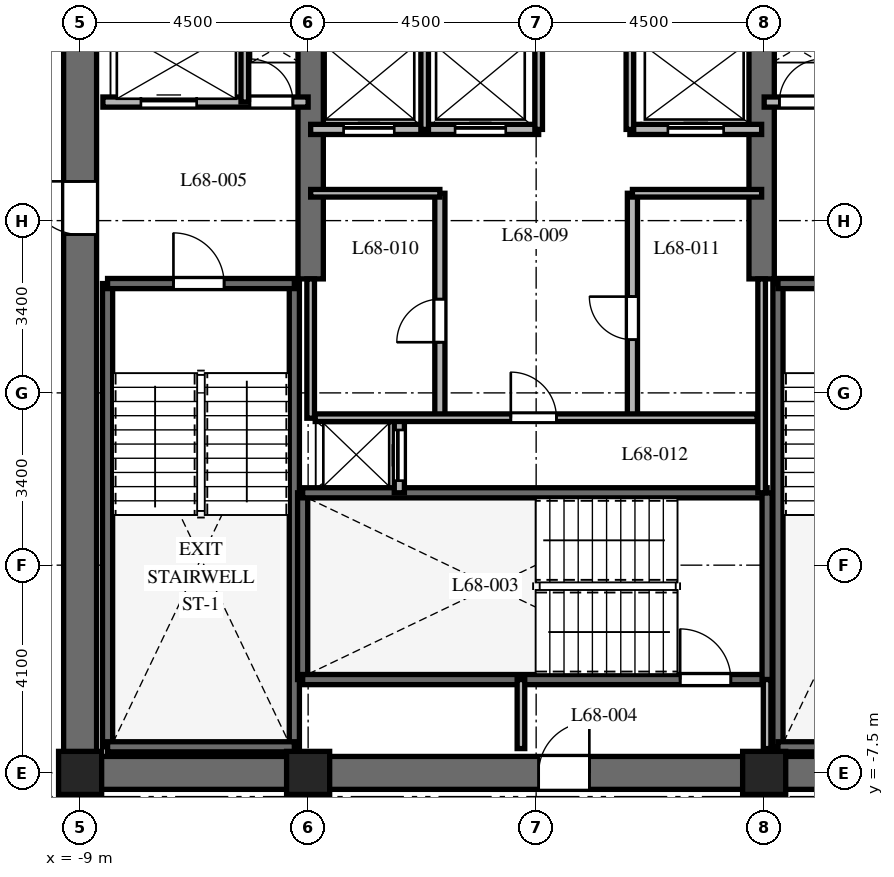
"""IFC4 building model, lengths in metres.
Left out: names, types, materials, properties, quantities, classifications, styles, units other than length and angle.
Written with IfcOpenShell. Run it as: python <this file> out.ifc"""

import sys

from ifc_helpers import new_model, si_unit, direction, frame, frame_2d, origin, origin_2d, place, context, subcontext, project, spatial, rectangle, extrude, element, fill, save


model = new_model("IFC4")
c1 = context("Model", 3, precision=1e-05, world=origin(), true_north=direction((0.0, 1.0)))
c2 = subcontext(c1, "Body", "Model", "MODEL_VIEW")
j1 = project(units=[si_unit("LENGTHUNIT", "METRE"), si_unit("PLANEANGLEUNIT", "RADIAN")], contexts=[c1])
p1 = place(None, origin())
s1 = spatial("IfcSite", under=j1, at=p1, CompositionType="ELEMENT")
p2 = place(p1, origin())
s2 = spatial("IfcBuilding", under=s1, at=p2, CompositionType="ELEMENT")
p3 = place(p2, frame((0.0, 0.0, 273.0)))
s3 = spatial("IfcBuildingStorey", under=s2, at=p3, CompositionType="ELEMENT", Elevation=273.0)
p4 = place(p3, frame((-9.325, -7.5, 0.0), z_axis=(0.0, 0.0, 1.0), x_axis=(1.0, 0.0, 0.0)))
e1 = element("IfcWall", 1, at=p4, inside=s3, PredefinedType="SHEAR", context=c2, shape_type="SweptSolid", body=[
    extrude(rectangle(XDim=18.65, YDim=0.65, at=frame_2d((9.325, 0.0))), origin(), (0.0, 0.0, 1.0), 3.9),
])
p5 = place(p4, frame((9.375, 0.0, 0.0)))
e2 = element("IfcOpeningElement", 2, at=p5, cuts=e1, PredefinedType="OPENING", context=c2, shape_type="SweptSolid", body=[
    extrude(rectangle(XDim=1.0, YDim=2.15, at=frame_2d((0.5, 1.075))), frame((0.0, 0.335, 0.0), z_axis=(0.0, -1.0, 0.0), x_axis=(1.0, 0.0, 0.0)), (0.0, 0.0, 1.0), 0.67),
])
p6 = place(p3, frame((-9.0, -7.175, 0.0), z_axis=(0.0, 0.0, 1.0), x_axis=(0.0, 1.0, 0.0)))
e3 = element("IfcWall", 3, at=p6, inside=s3, PredefinedType="SHEAR", context=c2, shape_type="SweptSolid", body=[
    extrude(rectangle(XDim=14.35, YDim=0.65, at=frame_2d((7.175, 0.0))), origin(), (0.0, 0.0, 1.0), 3.9),
])
p7 = place(p6, frame((10.3, 0.0, 0.0)))
e4 = element("IfcOpeningElement", 4, at=p7, cuts=e3, PredefinedType="OPENING", context=c2, shape_type="SweptSolid", body=[
    extrude(rectangle(XDim=1.05, YDim=2.15, at=frame_2d((0.525, 1.075))), frame((0.0, 0.335, 0.0), z_axis=(0.0, -1.0, 0.0), x_axis=(1.0, 0.0, 0.0)), (0.0, 0.0, 1.0), 0.67),
])
for number, where, z_axis, x_axis in (
    (5, (-4.45, 2.25, 0.0), (0.0, 0.0, 1.0), (0.0, 1.0, 0.0)),
    (6, (4.45, 2.25, 0.0), (0.0, 0.0, 1.0), (0.0, 1.0, 0.0)),
):
    element("IfcWall", number, at=place(p3, frame(where, z_axis=z_axis, x_axis=x_axis)), inside=s3, PredefinedType="SHEAR", context=c2, shape_type="SweptSolid", body=[
        extrude(rectangle(XDim=4.925, YDim=0.5, at=frame_2d((2.462, 0.0))), origin(), (0.0, 0.0, 1.0), 3.9),
    ])
for number, where, z_axis, x_axis in (
    (7, (-8.458, -6.985, 0.0), (0.0, 0.0, 1.0), (0.0, 1.0, 0.0)),
    (8, (-4.772, -6.985, 0.0), (0.0, 0.0, 1.0), (0.0, 1.0, 0.0)),
):
    element("IfcWall", number, at=place(p3, frame(where, z_axis=z_axis, x_axis=x_axis)), inside=s3, PredefinedType="SHEAR", context=c2, shape_type="SweptSolid", body=[
        extrude(rectangle(XDim=9.143, YDim=0.2, at=frame_2d((4.572, 0.0))), origin(), (0.0, 0.0, 1.0), 3.9),
    ])
p8 = place(p3, frame((-8.458, -6.985, 0.0), z_axis=(0.0, 0.0, 1.0), x_axis=(1.0, 0.0, 0.0)))
e9 = element("IfcWall", 9, at=p8, inside=s3, PredefinedType="SHEAR", context=c2, shape_type="SweptSolid", body=[
    extrude(rectangle(XDim=3.686, YDim=0.2, at=frame_2d((1.843, 0.0))), origin(), (0.0, 0.0, 1.0), 3.9),
])
p9 = place(p3, frame((-8.458, 2.158, 0.0), z_axis=(0.0, 0.0, 1.0), x_axis=(1.0, 0.0, 0.0)))
e10 = element("IfcWall", 10, at=p9, inside=s3, PredefinedType="SHEAR", context=c2, shape_type="SweptSolid", body=[
    extrude(rectangle(XDim=3.686, YDim=0.2, at=frame_2d((1.843, 0.0))), origin(), (0.0, 0.0, 1.0), 3.9),
])
p10 = place(p9, frame((1.3, 0.0, 0.0)))
e11 = element("IfcOpeningElement", 11, at=p10, cuts=e10, PredefinedType="OPENING", context=c2, shape_type="SweptSolid", body=[
    extrude(rectangle(XDim=1.0, YDim=2.15, at=frame_2d((0.5, 1.075))), frame((0.0, 0.11, 0.0), z_axis=(0.0, -1.0, 0.0), x_axis=(1.0, 0.0, 0.0)), (0.0, 0.0, 1.0), 0.22),
])
p11 = place(p3, frame((4.772, -6.985, 0.0), z_axis=(0.0, 0.0, 1.0), x_axis=(0.0, 1.0, 0.0)))
e12 = element("IfcWall", 12, at=p11, inside=s3, PredefinedType="SHEAR", context=c2, shape_type="SweptSolid", body=[
    extrude(rectangle(XDim=9.143, YDim=0.2, at=frame_2d((4.572, 0.0))), origin(), (0.0, 0.0, 1.0), 3.9),
])
p12 = place(p3, frame((4.772, -6.985, 0.0), z_axis=(0.0, 0.0, 1.0), x_axis=(1.0, 0.0, 0.0)))
e13 = element("IfcWall", 13, at=p12, inside=s3, PredefinedType="SHEAR", context=c2, shape_type="SweptSolid", body=[
    extrude(rectangle(XDim=3.686, YDim=0.2, at=frame_2d((1.843, 0.0))), origin(), (0.0, 0.0, 1.0), 3.9),
])
p13 = place(p3, frame((4.772, 2.158, 0.0), z_axis=(0.0, 0.0, 1.0), x_axis=(1.0, 0.0, 0.0)))
e14 = element("IfcWall", 14, at=p13, inside=s3, PredefinedType="SHEAR", context=c2, shape_type="SweptSolid", body=[
    extrude(rectangle(XDim=3.686, YDim=0.2, at=frame_2d((1.843, 0.0))), origin(), (0.0, 0.0, 1.0), 3.9),
])
p14 = place(p13, frame((1.35, 0.0, 0.0)))
e15 = element("IfcOpeningElement", 15, at=p14, cuts=e14, PredefinedType="OPENING", context=c2, shape_type="SweptSolid", body=[
    extrude(rectangle(XDim=1.0, YDim=2.15, at=frame_2d((0.5, 1.075))), frame((0.0, 0.11, 0.0), z_axis=(0.0, -1.0, 0.0), x_axis=(1.0, 0.0, 0.0)), (0.0, 0.0, 1.0), 0.22),
])
p15 = place(p3, frame((-4.608, -5.658, 0.0), z_axis=(0.0, 0.0, 1.0), x_axis=(0.0, 1.0, 0.0)))
e16 = element("IfcWall", 16, at=p15, inside=s3, PredefinedType="SHEAR", context=c2, shape_type="SweptSolid", body=[
    extrude(rectangle(XDim=3.686, YDim=0.2, at=frame_2d((1.843, 0.0))), origin(), (0.0, 0.0, 1.0), 3.9),
])
p16 = place(p3, frame((-4.608, -5.658, 0.0), z_axis=(0.0, 0.0, 1.0), x_axis=(1.0, 0.0, 0.0)))
e17 = element("IfcWall", 17, at=p16, inside=s3, PredefinedType="SHEAR", context=c2, shape_type="SweptSolid", body=[
    extrude(rectangle(XDim=9.166, YDim=0.2, at=frame_2d((4.583, 0.0))), origin(), (0.0, 0.0, 1.0), 3.9),
])
p17 = place(p16, frame((7.45, 0.0, 0.0)))
e18 = element("IfcOpeningElement", 18, at=p17, cuts=e17, PredefinedType="OPENING", context=c2, shape_type="SweptSolid", body=[
    extrude(rectangle(XDim=1.0, YDim=2.15, at=frame_2d((0.5, 1.075))), frame((0.0, 0.11, 0.0), z_axis=(0.0, -1.0, 0.0), x_axis=(1.0, 0.0, 0.0)), (0.0, 0.0, 1.0), 0.22),
])
p18 = place(p3, frame((-4.608, -1.972, 0.0), z_axis=(0.0, 0.0, 1.0), x_axis=(1.0, 0.0, 0.0)))
e19 = element("IfcWall", 19, at=p18, inside=s3, PredefinedType="SHEAR", context=c2, shape_type="SweptSolid", body=[
    extrude(rectangle(XDim=9.166, YDim=0.2, at=frame_2d((4.583, 0.0))), origin(), (0.0, 0.0, 1.0), 3.9),
])
p19 = place(p3, frame((4.558, -5.658, 0.0), z_axis=(0.0, 0.0, 1.0), x_axis=(0.0, 1.0, 0.0)))
e20 = element("IfcWall", 20, at=p19, inside=s3, PredefinedType="SHEAR", context=c2, shape_type="SweptSolid", body=[
    extrude(rectangle(XDim=3.686, YDim=0.2, at=frame_2d((1.843, 0.0))), origin(), (0.0, 0.0, 1.0), 3.9),
])
for number, where, z_axis, x_axis in (
    (21, (-9.0, -7.5, 0.0), (0.0, 0.0, 1.0), (1.0, 0.0, 0.0)),
    (22, (-4.5, -7.5, 0.0), (0.0, 0.0, 1.0), (1.0, 0.0, 0.0)),
    (23, (4.5, -7.5, 0.0), (0.0, 0.0, 1.0), (1.0, 0.0, 0.0)),
):
    element("IfcColumn", number, at=place(p3, frame(where, z_axis=z_axis, x_axis=x_axis)), inside=s3, PredefinedType="COLUMN", context=c2, shape_type="SweptSolid", body=[
        extrude(rectangle(XDim=0.85, YDim=0.85, at=origin_2d()), origin(), (0.0, 0.0, 1.0), 3.9),
    ])
for number, where, z_axis, x_axis in (
    (24, (-0.3, -7.02, 0.0), (0.0, 0.0, 1.0), (0.0, 1.0, 0.0)),
    (25, (4.558, -7.02, 0.0), (0.0, 0.0, 1.0), (0.0, 1.0, 0.0)),
):
    element("IfcWall", number, at=place(p3, frame(where, z_axis=z_axis, x_axis=x_axis)), inside=s3, PredefinedType="PARTITIONING", context=c2, shape_type="SweptSolid", body=[
        extrude(rectangle(XDim=1.362, YDim=0.15, at=frame_2d((0.681, 0.0))), origin(), (0.0, 0.0, 1.0), 3.6),
    ])
p20 = place(p3, frame((-8.55, 5.74, 0.0), z_axis=(0.0, 0.0, 1.0), x_axis=(1.0, 0.0, 0.0)))
e26 = element("IfcWall", 26, at=p20, inside=s3, PredefinedType="PARTITIONING", context=c2, shape_type="SweptSolid", body=[
    extrude(rectangle(XDim=4.05, YDim=0.2, at=frame_2d((2.025, 0.0))), origin(), (0.0, 0.0, 1.0), 3.6),
])
p21 = place(p20, frame((0.75, 0.0, 0.0)))
e27 = element("IfcOpeningElement", 27, at=p21, cuts=e26, PredefinedType="OPENING", context=c2, shape_type="SweptSolid", body=[
    extrude(rectangle(XDim=1.1, YDim=2.2, at=frame_2d((0.55, 1.1))), frame((0.0, 0.11, 0.0), z_axis=(0.0, -1.0, 0.0), x_axis=(1.0, 0.0, 0.0)), (0.0, 0.0, 1.0), 0.22),
])
p22 = place(p20, frame((2.9, 0.0, 0.0)))
e28 = element("IfcOpeningElement", 28, at=p22, cuts=e26, PredefinedType="OPENING", context=c2, shape_type="SweptSolid", body=[
    extrude(rectangle(XDim=0.85, YDim=2.03, at=frame_2d((0.425, 1.015))), frame((0.0, 0.11, 0.0), z_axis=(0.0, -1.0, 0.0), x_axis=(1.0, 0.0, 0.0)), (0.0, 0.0, 1.0), 0.22),
])
p23 = place(p3, frame((-5.75, 5.74, 0.0), z_axis=(0.0, 0.0, 1.0), x_axis=(0.0, 1.0, 0.0)))
e29 = element("IfcWall", 29, at=p23, inside=s3, PredefinedType="PARTITIONING", context=c2, shape_type="SweptSolid", body=[
    extrude(rectangle(XDim=1.41, YDim=0.15, at=frame_2d((0.705, 0.0))), origin(), (0.0, 0.0, 1.0), 3.6),
])
p24 = place(p3, frame((4.5, 5.74, 0.0), z_axis=(0.0, 0.0, 1.0), x_axis=(1.0, 0.0, 0.0)))
e30 = element("IfcWall", 30, at=p24, inside=s3, PredefinedType="PARTITIONING", context=c2, shape_type="SweptSolid", body=[
    extrude(rectangle(XDim=4.05, YDim=0.2, at=frame_2d((2.025, 0.0))), origin(), (0.0, 0.0, 1.0), 3.6),
])
p25 = place(p24, frame((0.3, 0.0, 0.0)))
e31 = element("IfcOpeningElement", 31, at=p25, cuts=e30, PredefinedType="OPENING", context=c2, shape_type="SweptSolid", body=[
    extrude(rectangle(XDim=0.85, YDim=2.03, at=frame_2d((0.425, 1.015))), frame((0.0, 0.11, 0.0), z_axis=(0.0, -1.0, 0.0), x_axis=(1.0, 0.0, 0.0)), (0.0, 0.0, 1.0), 0.22),
])
p26 = place(p24, frame((2.15, 0.0, 0.0)))
e32 = element("IfcOpeningElement", 32, at=p26, cuts=e30, PredefinedType="OPENING", context=c2, shape_type="SweptSolid", body=[
    extrude(rectangle(XDim=1.1, YDim=2.2, at=frame_2d((0.55, 1.1))), frame((0.0, 0.11, 0.0), z_axis=(0.0, -1.0, 0.0), x_axis=(1.0, 0.0, 0.0)), (0.0, 0.0, 1.0), 0.22),
])
p27 = place(p3, frame((-2.7, -1.972, 0.0), z_axis=(0.0, 0.0, 1.0), x_axis=(0.0, 1.0, 0.0)))
e33 = element("IfcWall", 33, at=p27, inside=s3, PredefinedType="PARTITIONING", context=c2, shape_type="SweptSolid", body=[
    extrude(rectangle(XDim=1.472, YDim=0.2, at=frame_2d((0.736, 0.0))), origin(), (0.0, 0.0, 1.0), 3.6),
])
p28 = place(p27, frame((0.24, 0.0, 0.0)))
e34 = element("IfcOpeningElement", 34, at=p28, cuts=e33, PredefinedType="OPENING", context=c2, shape_type="SweptSolid", body=[
    extrude(rectangle(XDim=1.0, YDim=2.2, at=frame_2d((0.5, 1.1))), frame((0.0, 0.11, 0.0), z_axis=(0.0, -1.0, 0.0), x_axis=(1.0, 0.0, 0.0)), (0.0, 0.0, 1.0), 0.22),
])
p29 = place(p3, frame((-4.45, 5.2, 0.0), z_axis=(0.0, 0.0, 1.0), x_axis=(1.0, 0.0, 0.0)))
e35 = element("IfcWall", 35, at=p29, inside=s3, PredefinedType="PARTITIONING", context=c2, shape_type="SweptSolid", body=[
    extrude(rectangle(XDim=4.5, YDim=0.2, at=frame_2d((2.25, 0.0))), origin(), (0.0, 0.0, 1.0), 3.6),
])
p30 = place(p29, frame((0.65, 0.0, 0.0)))
e36 = element("IfcOpeningElement", 36, at=p30, cuts=e35, PredefinedType="OPENING", context=c2, shape_type="SweptSolid", body=[
    extrude(rectangle(XDim=1.0, YDim=2.2, at=frame_2d((0.5, 1.1))), frame((0.0, 0.11, 0.0), z_axis=(0.0, -1.0, 0.0), x_axis=(1.0, 0.0, 0.0)), (0.0, 0.0, 1.0), 0.22),
])
p31 = place(p29, frame((2.85, 0.0, 0.0)))
e37 = element("IfcOpeningElement", 37, at=p31, cuts=e35, PredefinedType="OPENING", context=c2, shape_type="SweptSolid", body=[
    extrude(rectangle(XDim=1.0, YDim=2.2, at=frame_2d((0.5, 1.1))), frame((0.0, 0.11, 0.0), z_axis=(0.0, -1.0, 0.0), x_axis=(1.0, 0.0, 0.0)), (0.0, 0.0, 1.0), 0.22),
])
p32 = place(p3, frame((1.85, 5.2, 0.0), z_axis=(0.0, 0.0, 1.0), x_axis=(1.0, 0.0, 0.0)))
e38 = element("IfcWall", 38, at=p32, inside=s3, PredefinedType="PARTITIONING", context=c2, shape_type="SweptSolid", body=[
    extrude(rectangle(XDim=2.6, YDim=0.2, at=frame_2d((1.3, 0.0))), origin(), (0.0, 0.0, 1.0), 3.6),
])
p33 = place(p32, frame((0.75, 0.0, 0.0)))
e39 = element("IfcOpeningElement", 39, at=p33, cuts=e38, PredefinedType="OPENING", context=c2, shape_type="SweptSolid", body=[
    extrude(rectangle(XDim=1.1, YDim=2.2, at=frame_2d((0.55, 1.1))), frame((0.0, 0.11, 0.0), z_axis=(0.0, -1.0, 0.0), x_axis=(1.0, 0.0, 0.0)), (0.0, 0.0, 1.0), 0.22),
])
p34 = place(p3, frame((-2.2, 5.2, 0.0), z_axis=(0.0, 0.0, 1.0), x_axis=(0.0, 1.0, 0.0)))
e40 = element("IfcWall", 40, at=p34, inside=s3, PredefinedType="PARTITIONING", context=c2, shape_type="SweptSolid", body=[
    extrude(rectangle(XDim=1.85, YDim=0.15, at=frame_2d((0.925, 0.0))), origin(), (0.0, 0.0, 1.0), 3.6),
])
for number, where, z_axis, x_axis in (
    (41, (0.05, 5.2, 0.0), (0.0, 0.0, 1.0), (0.0, 1.0, 0.0)),
    (42, (1.85, 5.2, 0.0), (0.0, 0.0, 1.0), (0.0, 1.0, 0.0)),
):
    element("IfcWall", number, at=place(p3, frame(where, z_axis=z_axis, x_axis=x_axis)), inside=s3, PredefinedType="PARTITIONING", context=c2, shape_type="SweptSolid", body=[
        extrude(rectangle(XDim=1.95, YDim=0.15, at=frame_2d((0.975, 0.0))), origin(), (0.0, 0.0, 1.0), 3.6),
    ])
p35 = place(p3, frame((-4.45, -0.5, 0.0), z_axis=(0.0, 0.0, 1.0), x_axis=(0.0, 1.0, 0.0)))
e43 = element("IfcWall", 43, at=p35, inside=s3, PredefinedType="PARTITIONING", context=c2, shape_type="SweptSolid", body=[
    extrude(rectangle(XDim=2.75, YDim=0.15, at=frame_2d((1.375, 0.0))), origin(), (0.0, 0.0, 1.0), 3.6),
])
p36 = place(p3, frame((4.45, -1.972, 0.0), z_axis=(0.0, 0.0, 1.0), x_axis=(0.0, 1.0, 0.0)))
e44 = element("IfcWall", 44, at=p36, inside=s3, PredefinedType="PARTITIONING", context=c2, shape_type="SweptSolid", body=[
    extrude(rectangle(XDim=4.222, YDim=0.15, at=frame_2d((2.111, 0.0))), origin(), (0.0, 0.0, 1.0), 3.6),
])
p37 = place(p3, frame((-1.9, -0.5, 0.0), z_axis=(0.0, 0.0, 1.0), x_axis=(0.0, 1.0, 0.0)))
e45 = element("IfcWall", 45, at=p37, inside=s3, PredefinedType="PARTITIONING", context=c2, shape_type="SweptSolid", body=[
    extrude(rectangle(XDim=4.44, YDim=0.2, at=frame_2d((2.22, 0.0))), origin(), (0.0, 0.0, 1.0), 3.6),
])
p38 = place(p37, frame((1.5, 0.0, 0.0)))
e46 = element("IfcOpeningElement", 46, at=p38, cuts=e45, PredefinedType="OPENING", context=c2, shape_type="SweptSolid", body=[
    extrude(rectangle(XDim=0.85, YDim=2.03, at=frame_2d((0.425, 1.015))), frame((0.0, 0.11, 0.0), z_axis=(0.0, -1.0, 0.0), x_axis=(1.0, 0.0, 0.0)), (0.0, 0.0, 1.0), 0.22),
])
p39 = place(p3, frame((-4.45, 3.94, 0.0), z_axis=(0.0, 0.0, 1.0), x_axis=(1.0, 0.0, 0.0)))
e47 = element("IfcWall", 47, at=p39, inside=s3, PredefinedType="PARTITIONING", context=c2, shape_type="SweptSolid", body=[
    extrude(rectangle(XDim=2.55, YDim=0.15, at=frame_2d((1.275, 0.0))), origin(), (0.0, 0.0, 1.0), 3.6),
])
p40 = place(p3, frame((1.9, -0.5, 0.0), z_axis=(0.0, 0.0, 1.0), x_axis=(0.0, 1.0, 0.0)))
e48 = element("IfcWall", 48, at=p40, inside=s3, PredefinedType="PARTITIONING", context=c2, shape_type="SweptSolid", body=[
    extrude(rectangle(XDim=4.44, YDim=0.2, at=frame_2d((2.22, 0.0))), origin(), (0.0, 0.0, 1.0), 3.6),
])
p41 = place(p40, frame((1.55, 0.0, 0.0)))
e49 = element("IfcOpeningElement", 49, at=p41, cuts=e48, PredefinedType="OPENING", context=c2, shape_type="SweptSolid", body=[
    extrude(rectangle(XDim=0.85, YDim=2.03, at=frame_2d((0.425, 1.015))), frame((0.0, 0.11, 0.0), z_axis=(0.0, -1.0, 0.0), x_axis=(1.0, 0.0, 0.0)), (0.0, 0.0, 1.0), 0.22),
])
p42 = place(p3, frame((1.9, 3.94, 0.0), z_axis=(0.0, 0.0, 1.0), x_axis=(1.0, 0.0, 0.0)))
e50 = element("IfcWall", 50, at=p42, inside=s3, PredefinedType="PARTITIONING", context=c2, shape_type="SweptSolid", body=[
    extrude(rectangle(XDim=2.55, YDim=0.15, at=frame_2d((1.275, 0.0))), origin(), (0.0, 0.0, 1.0), 3.6),
])
p43 = place(p3, frame((-4.36, -0.49, 0.0), z_axis=(0.0, 0.0, 1.0), x_axis=(1.0, 0.0, 0.0)))
e51 = element("IfcWall", 51, at=p43, inside=s3, PredefinedType="PARTITIONING", context=c2, shape_type="SweptSolid", body=[
    extrude(rectangle(XDim=8.72, YDim=0.15, at=frame_2d((4.36, 0.0))), origin(), (0.0, 0.0, 1.0), 3.6),
])
p44 = place(p43, frame((3.86, 0.0, 0.0)))
e52 = element("IfcOpeningElement", 52, at=p44, cuts=e51, PredefinedType="OPENING", context=c2, shape_type="SweptSolid", body=[
    extrude(rectangle(XDim=0.9, YDim=2.03, at=frame_2d((0.45, 1.015))), frame((0.0, 0.085, 0.0), z_axis=(0.0, -1.0, 0.0), x_axis=(1.0, 0.0, 0.0)), (0.0, 0.0, 1.0), 0.17),
])
p45 = place(p10, origin())
e53 = element("IfcDoor", 53, at=p45, inside=s3, OperationType="SINGLE_SWING_LEFT", PredefinedType="DOOR", context=c2, shape_type="SweptSolid", body=[
    extrude(rectangle(XDim=1.0, YDim=2.15, at=frame_2d((0.5, 1.075))), frame((0.0, 0.025, 0.0), z_axis=(0.0, -1.0, 0.0), x_axis=(1.0, 0.0, 0.0)), (0.0, 0.0, 1.0), 0.05),
])
fill(e11, e53)
p46 = place(p17, origin())
e54 = element("IfcDoor", 54, at=p46, inside=s3, OperationType="SINGLE_SWING_LEFT", PredefinedType="DOOR", context=c2, shape_type="SweptSolid", body=[
    extrude(rectangle(XDim=1.0, YDim=2.15, at=frame_2d((0.5, 1.075))), frame((0.0, 0.025, 0.0), z_axis=(0.0, -1.0, 0.0), x_axis=(1.0, 0.0, 0.0)), (0.0, 0.0, 1.0), 0.05),
])
fill(e18, e54)
p47 = place(p5, origin())
e55 = element("IfcDoor", 55, at=p47, inside=s3, OperationType="SINGLE_SWING_RIGHT", PredefinedType="DOOR", context=c2, shape_type="SweptSolid", body=[
    extrude(rectangle(XDim=1.0, YDim=2.15, at=frame_2d((0.5, 1.075))), frame((0.0, 0.025, 0.0), z_axis=(0.0, -1.0, 0.0), x_axis=(1.0, 0.0, 0.0)), (0.0, 0.0, 1.0), 0.05),
])
fill(e2, e55)
p48 = place(p7, origin())
e56 = element("IfcDoor", 56, at=p48, inside=s3, OperationType="SINGLE_SWING_RIGHT", PredefinedType="DOOR", context=c2, shape_type="SweptSolid", body=[
    extrude(rectangle(XDim=1.05, YDim=2.15, at=frame_2d((0.525, 1.075))), frame((0.0, 0.025, 0.0), z_axis=(0.0, -1.0, 0.0), x_axis=(1.0, 0.0, 0.0)), (0.0, 0.0, 1.0), 0.05),
])
fill(e4, e56)
p49 = place(p21, origin())
e57 = element("IfcDoor", 57, at=p49, inside=s3, OperationType="SLIDING_TO_LEFT", PredefinedType="DOOR", context=c2, shape_type="SweptSolid", body=[
    extrude(rectangle(XDim=1.1, YDim=2.2, at=frame_2d((0.55, 1.1))), frame((0.0, 0.025, 0.0), z_axis=(0.0, -1.0, 0.0), x_axis=(1.0, 0.0, 0.0)), (0.0, 0.0, 1.0), 0.05),
])
fill(e27, e57)
p50 = place(p22, origin())
e58 = element("IfcDoor", 58, at=p50, inside=s3, OperationType="SINGLE_SWING_LEFT", PredefinedType="DOOR", context=c2, shape_type="SweptSolid", body=[
    extrude(rectangle(XDim=0.85, YDim=2.03, at=frame_2d((0.425, 1.015))), frame((0.0, 0.025, 0.0), z_axis=(0.0, -1.0, 0.0), x_axis=(1.0, 0.0, 0.0)), (0.0, 0.0, 1.0), 0.05),
])
fill(e28, e58)
p51 = place(p25, origin())
e59 = element("IfcDoor", 59, at=p51, inside=s3, OperationType="SINGLE_SWING_RIGHT", PredefinedType="DOOR", context=c2, shape_type="SweptSolid", body=[
    extrude(rectangle(XDim=0.85, YDim=2.03, at=frame_2d((0.425, 1.015))), frame((0.0, 0.025, 0.0), z_axis=(0.0, -1.0, 0.0), x_axis=(1.0, 0.0, 0.0)), (0.0, 0.0, 1.0), 0.05),
])
fill(e31, e59)
p52 = place(p28, origin())
e60 = element("IfcDoor", 60, at=p52, inside=s3, OperationType="SLIDING_TO_LEFT", PredefinedType="DOOR", context=c2, shape_type="SweptSolid", body=[
    extrude(rectangle(XDim=1.0, YDim=2.2, at=frame_2d((0.5, 1.1))), frame((0.0, 0.025, 0.0), z_axis=(0.0, -1.0, 0.0), x_axis=(1.0, 0.0, 0.0)), (0.0, 0.0, 1.0), 0.05),
])
fill(e34, e60)
p53 = place(p30, origin())
e61 = element("IfcDoor", 61, at=p53, inside=s3, OperationType="SLIDING_TO_LEFT", PredefinedType="DOOR", context=c2, shape_type="SweptSolid", body=[
    extrude(rectangle(XDim=1.0, YDim=2.2, at=frame_2d((0.5, 1.1))), frame((0.0, 0.025, 0.0), z_axis=(0.0, -1.0, 0.0), x_axis=(1.0, 0.0, 0.0)), (0.0, 0.0, 1.0), 0.05),
])
fill(e36, e61)
p54 = place(p31, origin())
e62 = element("IfcDoor", 62, at=p54, inside=s3, OperationType="SLIDING_TO_RIGHT", PredefinedType="DOOR", context=c2, shape_type="SweptSolid", body=[
    extrude(rectangle(XDim=1.0, YDim=2.2, at=frame_2d((0.5, 1.1))), frame((0.0, 0.025, 0.0), z_axis=(0.0, -1.0, 0.0), x_axis=(1.0, 0.0, 0.0)), (0.0, 0.0, 1.0), 0.05),
])
fill(e37, e62)
p55 = place(p33, origin())
e63 = element("IfcDoor", 63, at=p55, inside=s3, OperationType="SLIDING_TO_RIGHT", PredefinedType="DOOR", context=c2, shape_type="SweptSolid", body=[
    extrude(rectangle(XDim=1.1, YDim=2.2, at=frame_2d((0.55, 1.1))), frame((0.0, 0.025, 0.0), z_axis=(0.0, -1.0, 0.0), x_axis=(1.0, 0.0, 0.0)), (0.0, 0.0, 1.0), 0.05),
])
fill(e39, e63)
p56 = place(p38, origin())
e64 = element("IfcDoor", 64, at=p56, inside=s3, OperationType="SINGLE_SWING_LEFT", PredefinedType="DOOR", context=c2, shape_type="SweptSolid", body=[
    extrude(rectangle(XDim=0.85, YDim=2.03, at=frame_2d((0.425, 1.015))), frame((0.0, 0.025, 0.0), z_axis=(0.0, -1.0, 0.0), x_axis=(1.0, 0.0, 0.0)), (0.0, 0.0, 1.0), 0.05),
])
fill(e46, e64)
p57 = place(p41, origin())
e65 = element("IfcDoor", 65, at=p57, inside=s3, OperationType="SINGLE_SWING_RIGHT", PredefinedType="DOOR", context=c2, shape_type="SweptSolid", body=[
    extrude(rectangle(XDim=0.85, YDim=2.03, at=frame_2d((0.425, 1.015))), frame((0.0, 0.025, 0.0), z_axis=(0.0, -1.0, 0.0), x_axis=(1.0, 0.0, 0.0)), (0.0, 0.0, 1.0), 0.05),
])
fill(e49, e65)
p58 = place(p44, origin())
e66 = element("IfcDoor", 66, at=p58, inside=s3, OperationType="SINGLE_SWING_LEFT", PredefinedType="DOOR", context=c2, shape_type="SweptSolid", body=[
    extrude(rectangle(XDim=0.9, YDim=2.03, at=frame_2d((0.45, 1.015))), frame((0.0, 0.025, 0.0), z_axis=(0.0, -1.0, 0.0), x_axis=(1.0, 0.0, 0.0)), (0.0, 0.0, 1.0), 0.05),
])
fill(e52, e66)
save(model, sys.argv[1])
